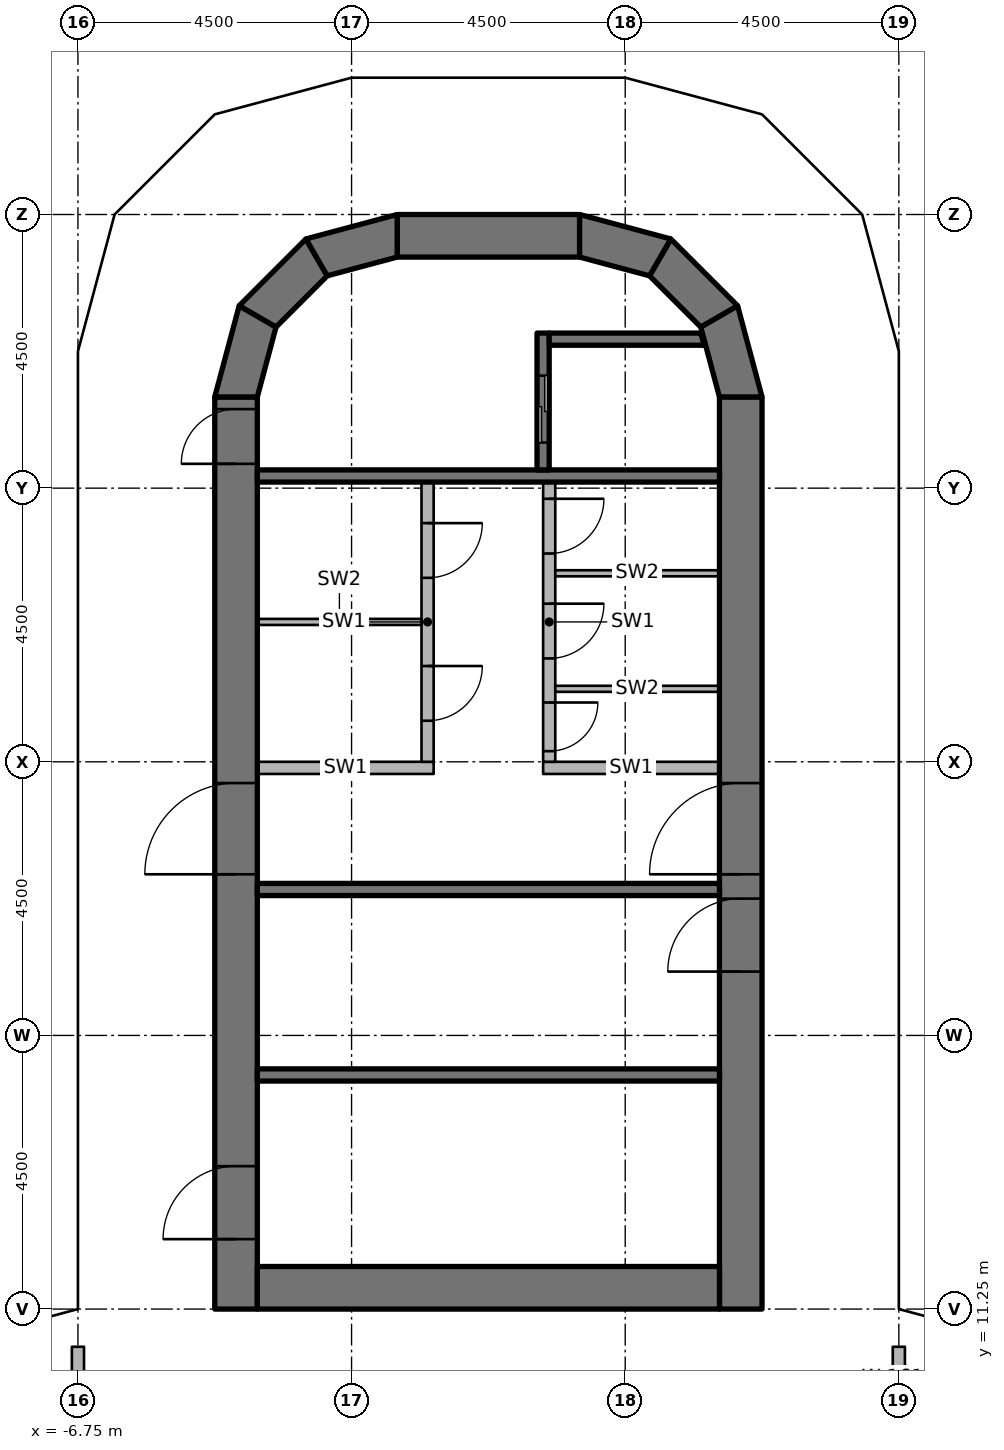
"""IFC4 building model, lengths in metres.
Left out: names, types, materials, properties, quantities, classifications, styles, units other than length and angle.
Written with IfcOpenShell. Run it as: python <this file> out.ifc"""

import sys

from ifc_helpers import new_model, si_unit, direction, frame, frame_2d, origin, origin_2d, place, context, subcontext, project, spatial, polyline, rectangle, outline, extrude, element, fill, save


model = new_model("IFC4")
c1 = context("Model", 3, precision=1e-05, world=origin(), true_north=direction((0.0, 1.0)))
c2 = subcontext(c1, "Body", "Model", "MODEL_VIEW")
j1 = project(units=[si_unit("LENGTHUNIT", "METRE"), si_unit("PLANEANGLEUNIT", "RADIAN")], contexts=[c1])
p1 = place(None, origin())
s1 = spatial("IfcSite", under=j1, at=p1, CompositionType="ELEMENT")
p2 = place(p1, origin())
s2 = spatial("IfcBuilding", under=s1, at=p2, CompositionType="ELEMENT")
p3 = place(p2, frame((0.0, 0.0, 156.2)))
s3 = spatial("IfcBuildingStorey", under=s2, at=p3, CompositionType="ELEMENT", Elevation=156.2)
for number, where, z_axis, x_axis in (
    (1, (-6.25, 10.75, 0.0), (0.0, 0.0, 1.0), (1.0, 0.0, 0.0)),
    (2, (-6.25, 15.75, 0.0), (0.0, 0.0, 1.0), (1.0, 0.0, 0.0)),
    (3, (-6.25, 20.25, 0.0), (0.0, 0.0, 1.0), (1.0, 0.0, 0.0)),
    (4, (-6.25, 24.65, 0.0), (0.0, 0.0, 1.0), (1.0, 0.0, 0.0)),
    (5, (-6.25, 26.7, 0.0), (0.0, 0.0, 1.0), (1.0, 0.0, 0.0)),
    (6, (6.25, 10.75, 0.0), (0.0, 0.0, 1.0), (1.0, 0.0, 0.0)),
    (7, (6.25, 15.75, 0.0), (0.0, 0.0, 1.0), (1.0, 0.0, 0.0)),
    (8, (6.25, 20.25, 0.0), (0.0, 0.0, 1.0), (1.0, 0.0, 0.0)),
    (9, (6.25, 24.65, 0.0), (0.0, 0.0, 1.0), (1.0, 0.0, 0.0)),
    (10, (6.25, 26.7, 0.0), (0.0, 0.0, 1.0), (1.0, 0.0, 0.0)),
):
    element("IfcColumn", number, at=place(p3, frame(where, z_axis=z_axis, x_axis=x_axis)), inside=s3, PredefinedType="COLUMN", context=c2, shape_type="SweptSolid", body=[
        extrude(rectangle(XDim=0.8, YDim=0.8, at=origin_2d()), origin(), (0.0, 0.0, 1.0), 3.65),
    ])
p4 = place(p3, frame((-4.15, 11.25, 0.0), z_axis=(0.0, 0.0, 1.0), x_axis=(0.0, 1.0, 0.0)))
e11 = element("IfcWall", 11, at=p4, inside=s3, PredefinedType="SHEAR", context=c2, shape_type="SweptSolid", body=[
    extrude(rectangle(XDim=15.0, YDim=0.7, at=frame_2d((7.5, 0.0))), origin(), (0.0, 0.0, 1.0), 3.8),
])
p5 = place(p4, frame((7.15, 0.0, 0.0)))
e12 = element("IfcOpeningElement", 12, at=p5, cuts=e11, PredefinedType="OPENING", context=c2, shape_type="SweptSolid", body=[
    extrude(rectangle(XDim=1.5, YDim=2.3, at=frame_2d((0.75, 1.15))), frame((0.0, 0.36, 0.0), z_axis=(0.0, -1.0, 0.0), x_axis=(1.0, 0.0, 0.0)), (0.0, 0.0, 1.0), 0.72),
])
p6 = place(p4, frame((13.9, 0.0, 0.0)))
e13 = element("IfcOpeningElement", 13, at=p6, cuts=e11, PredefinedType="OPENING", context=c2, shape_type="SweptSolid", body=[
    extrude(rectangle(XDim=0.9, YDim=2.1, at=frame_2d((0.45, 1.05))), frame((0.0, 0.36, 0.0), z_axis=(0.0, -1.0, 0.0), x_axis=(1.0, 0.0, 0.0)), (0.0, 0.0, 1.0), 0.72),
])
p7 = place(p4, frame((1.15, 0.0, 0.0)))
e14 = element("IfcOpeningElement", 14, at=p7, cuts=e11, PredefinedType="OPENING", context=c2, shape_type="SweptSolid", body=[
    extrude(rectangle(XDim=1.2, YDim=2.1, at=frame_2d((0.6, 1.05))), frame((0.0, 0.36, 0.0), z_axis=(0.0, -1.0, 0.0), x_axis=(1.0, 0.0, 0.0)), (0.0, 0.0, 1.0), 0.72),
])
p8 = place(p3, frame((4.15, 11.25, 0.0), z_axis=(0.0, 0.0, 1.0), x_axis=(0.0, 1.0, 0.0)))
e15 = element("IfcWall", 15, at=p8, inside=s3, PredefinedType="SHEAR", context=c2, shape_type="SweptSolid", body=[
    extrude(rectangle(XDim=15.0, YDim=0.7, at=frame_2d((7.5, 0.0))), origin(), (0.0, 0.0, 1.0), 3.8),
])
p9 = place(p8, frame((7.15, 0.0, 0.0)))
e16 = element("IfcOpeningElement", 16, at=p9, cuts=e15, PredefinedType="OPENING", context=c2, shape_type="SweptSolid", body=[
    extrude(rectangle(XDim=1.5, YDim=2.3, at=frame_2d((0.75, 1.15))), frame((0.0, 0.36, 0.0), z_axis=(0.0, -1.0, 0.0), x_axis=(1.0, 0.0, 0.0)), (0.0, 0.0, 1.0), 0.72),
])
p10 = place(p8, frame((5.55, 0.0, 0.0)))
e17 = element("IfcOpeningElement", 17, at=p10, cuts=e15, PredefinedType="OPENING", context=c2, shape_type="SweptSolid", body=[
    extrude(rectangle(XDim=1.2, YDim=2.1, at=frame_2d((0.6, 1.05))), frame((0.0, 0.36, 0.0), z_axis=(0.0, -1.0, 0.0), x_axis=(1.0, 0.0, 0.0)), (0.0, 0.0, 1.0), 0.72),
])
p11 = place(p3, frame((-3.8, 11.6, 0.0), z_axis=(0.0, 0.0, 1.0), x_axis=(1.0, 0.0, 0.0)))
e18 = element("IfcWall", 18, at=p11, inside=s3, PredefinedType="SHEAR", context=c2, shape_type="SweptSolid", body=[
    extrude(rectangle(XDim=7.6, YDim=0.7, at=frame_2d((3.8, 0.0))), origin(), (0.0, 0.0, 1.0), 3.8),
])
p12 = place(p3, frame((-1.5, 28.9, 0.0), z_axis=(0.0, 0.0, 1.0), x_axis=(1.0, 0.0, 0.0)))
e19 = element("IfcWall", 19, at=p12, inside=s3, PredefinedType="SHEAR", context=c2, shape_type="SweptSolid", body=[
    extrude(rectangle(XDim=3.0, YDim=0.7, at=frame_2d((1.5, 0.0))), origin(), (0.0, 0.0, 1.0), 3.8),
])
p13 = place(p3, origin())
e20 = element("IfcWall", 20, at=p13, inside=s3, PredefinedType="SHEAR", context=c2, shape_type="SweptSolid", body=[
    extrude(outline(polyline([(-4.5, 26.25), (-4.098, 27.75), (-3.492, 27.4), (-3.8, 26.25), (-4.5, 26.25)])), origin(), (0.0, 0.0, 1.0), 3.8),
])
p14 = place(p3, origin())
e21 = element("IfcWall", 21, at=p14, inside=s3, PredefinedType="SHEAR", context=c2, shape_type="SweptSolid", body=[
    extrude(outline(polyline([(-4.098, 27.75), (-3.0, 28.848), (-2.65, 28.242), (-3.492, 27.4), (-4.098, 27.75)])), origin(), (0.0, 0.0, 1.0), 3.8),
])
p15 = place(p3, origin())
e22 = element("IfcWall", 22, at=p15, inside=s3, PredefinedType="SHEAR", context=c2, shape_type="SweptSolid", body=[
    extrude(outline(polyline([(-3.0, 28.848), (-1.5, 29.25), (-1.5, 28.55), (-2.65, 28.242), (-3.0, 28.848)])), origin(), (0.0, 0.0, 1.0), 3.8),
])
p16 = place(p3, origin())
e23 = element("IfcWall", 23, at=p16, inside=s3, PredefinedType="SHEAR", context=c2, shape_type="SweptSolid", body=[
    extrude(outline(polyline([(4.5, 26.25), (4.098, 27.75), (3.492, 27.4), (3.8, 26.25), (4.5, 26.25)])), origin(), (0.0, 0.0, 1.0), 3.8),
])
p17 = place(p3, origin())
e24 = element("IfcWall", 24, at=p17, inside=s3, PredefinedType="SHEAR", context=c2, shape_type="SweptSolid", body=[
    extrude(outline(polyline([(4.098, 27.75), (3.0, 28.848), (2.65, 28.242), (3.492, 27.4), (4.098, 27.75)])), origin(), (0.0, 0.0, 1.0), 3.8),
])
p18 = place(p3, origin())
e25 = element("IfcWall", 25, at=p18, inside=s3, PredefinedType="SHEAR", context=c2, shape_type="SweptSolid", body=[
    extrude(outline(polyline([(3.0, 28.848), (1.5, 29.25), (1.5, 28.55), (2.65, 28.242), (3.0, 28.848)])), origin(), (0.0, 0.0, 1.0), 3.8),
])
p19 = place(p3, frame((-3.8, 24.95, 0.0), z_axis=(0.0, 0.0, 1.0), x_axis=(1.0, 0.0, 0.0)))
e26 = element("IfcWall", 26, at=p19, inside=s3, PredefinedType="SHEAR", context=c2, shape_type="SweptSolid", body=[
    extrude(rectangle(XDim=7.6, YDim=0.2, at=frame_2d((3.8, 0.0))), origin(), (0.0, 0.0, 1.0), 3.65),
])
p20 = place(p3, frame((0.9, 27.3, 0.0), z_axis=(0.0, 0.0, 1.0), x_axis=(0.0, -1.0, 0.0)))
e27 = element("IfcWall", 27, at=p20, inside=s3, PredefinedType="SHEAR", context=c2, shape_type="SweptSolid", body=[
    extrude(rectangle(XDim=2.25, YDim=0.2, at=frame_2d((1.125, 0.0))), origin(), (0.0, 0.0, 1.0), 3.65),
])
p21 = place(p20, frame((0.7, 0.0, 0.0)))
e28 = element("IfcOpeningElement", 28, at=p21, cuts=e27, PredefinedType="OPENING", context=c2, shape_type="SweptSolid", body=[
    extrude(rectangle(XDim=1.1, YDim=2.3, at=frame_2d((0.55, 1.15))), frame((0.0, 0.11, 0.0), z_axis=(0.0, -1.0, 0.0), x_axis=(1.0, 0.0, 0.0)), (0.0, 0.0, 1.0), 0.22),
])
p22 = place(p3, origin())
e29 = element("IfcWall", 29, at=p22, inside=s3, PredefinedType="SHEAR", context=c2, shape_type="SweptSolid", body=[
    extrude(outline(polyline([(1.0, 27.1), (3.548, 27.1), (3.494, 27.3), (1.0, 27.3), (1.0, 27.1)])), origin(), (0.0, 0.0, 1.0), 3.65),
])
for number, where, z_axis, x_axis in (
    (30, (-3.8, 18.15, 0.0), (0.0, 0.0, 1.0), (1.0, 0.0, 0.0)),
    (31, (-3.8, 15.1, 0.0), (0.0, 0.0, 1.0), (1.0, 0.0, 0.0)),
):
    element("IfcWall", number, at=place(p3, frame(where, z_axis=z_axis, x_axis=x_axis)), inside=s3, PredefinedType="SHEAR", context=c2, shape_type="SweptSolid", body=[
        extrude(rectangle(XDim=7.6, YDim=0.2, at=frame_2d((3.8, 0.0))), origin(), (0.0, 0.0, 1.0), 3.65),
    ])
p23 = place(p3, frame((-3.8, 20.15, 0.0), z_axis=(0.0, 0.0, 1.0), x_axis=(1.0, 0.0, 0.0)))
e32 = element("IfcWall", 32, at=p23, inside=s3, PredefinedType="PARTITIONING", context=c2, shape_type="SweptSolid", body=[
    extrude(rectangle(XDim=2.9, YDim=0.2, at=frame_2d((1.45, 0.0))), origin(), (0.0, 0.0, 1.0), 3.65),
])
p24 = place(p3, frame((-1.0, 24.85, 0.0), z_axis=(0.0, 0.0, 1.0), x_axis=(0.0, -1.0, 0.0)))
e33 = element("IfcWall", 33, at=p24, inside=s3, PredefinedType="PARTITIONING", context=c2, shape_type="SweptSolid", body=[
    extrude(rectangle(XDim=4.6, YDim=0.2, at=frame_2d((2.3, 0.0))), origin(), (0.0, 0.0, 1.0), 3.65),
])
p25 = place(p24, frame((0.675, 0.0, 0.0)))
e34 = element("IfcOpeningElement", 34, at=p25, cuts=e33, PredefinedType="OPENING", context=c2, shape_type="SweptSolid", body=[
    extrude(rectangle(XDim=0.9, YDim=2.1, at=frame_2d((0.45, 1.05))), frame((0.0, 0.11, 0.0), z_axis=(0.0, -1.0, 0.0), x_axis=(1.0, 0.0, 0.0)), (0.0, 0.0, 1.0), 0.22),
])
p26 = place(p24, frame((3.025, 0.0, 0.0)))
e35 = element("IfcOpeningElement", 35, at=p26, cuts=e33, PredefinedType="OPENING", context=c2, shape_type="SweptSolid", body=[
    extrude(rectangle(XDim=0.9, YDim=2.1, at=frame_2d((0.45, 1.05))), frame((0.0, 0.11, 0.0), z_axis=(0.0, -1.0, 0.0), x_axis=(1.0, 0.0, 0.0)), (0.0, 0.0, 1.0), 0.22),
])
p27 = place(p3, frame((0.9, 20.15, 0.0), z_axis=(0.0, 0.0, 1.0), x_axis=(1.0, 0.0, 0.0)))
e36 = element("IfcWall", 36, at=p27, inside=s3, PredefinedType="PARTITIONING", context=c2, shape_type="SweptSolid", body=[
    extrude(rectangle(XDim=2.9, YDim=0.2, at=frame_2d((1.45, 0.0))), origin(), (0.0, 0.0, 1.0), 3.65),
])
p28 = place(p3, frame((1.0, 24.85, 0.0), z_axis=(0.0, 0.0, 1.0), x_axis=(0.0, -1.0, 0.0)))
e37 = element("IfcWall", 37, at=p28, inside=s3, PredefinedType="PARTITIONING", context=c2, shape_type="SweptSolid", body=[
    extrude(rectangle(XDim=4.6, YDim=0.2, at=frame_2d((2.3, 0.0))), origin(), (0.0, 0.0, 1.0), 3.65),
])
p29 = place(p28, frame((0.275, 0.0, 0.0)))
e38 = element("IfcOpeningElement", 38, at=p29, cuts=e37, PredefinedType="OPENING", context=c2, shape_type="SweptSolid", body=[
    extrude(rectangle(XDim=0.9, YDim=2.1, at=frame_2d((0.45, 1.05))), frame((0.0, 0.11, 0.0), z_axis=(0.0, -1.0, 0.0), x_axis=(1.0, 0.0, 0.0)), (0.0, 0.0, 1.0), 0.22),
])
p30 = place(p28, frame((2.0, 0.0, 0.0)))
e39 = element("IfcOpeningElement", 39, at=p30, cuts=e37, PredefinedType="OPENING", context=c2, shape_type="SweptSolid", body=[
    extrude(rectangle(XDim=0.9, YDim=2.1, at=frame_2d((0.45, 1.05))), frame((0.0, 0.11, 0.0), z_axis=(0.0, -1.0, 0.0), x_axis=(1.0, 0.0, 0.0)), (0.0, 0.0, 1.0), 0.22),
])
p31 = place(p28, frame((3.625, 0.0, 0.0)))
e40 = element("IfcOpeningElement", 40, at=p31, cuts=e37, PredefinedType="OPENING", context=c2, shape_type="SweptSolid", body=[
    extrude(rectangle(XDim=0.8, YDim=2.1, at=frame_2d((0.4, 1.05))), frame((0.0, 0.11, 0.0), z_axis=(0.0, -1.0, 0.0), x_axis=(1.0, 0.0, 0.0)), (0.0, 0.0, 1.0), 0.22),
])
for number, where, z_axis, x_axis in (
    (41, (-3.8, 22.55, 0.0), (0.0, 0.0, 1.0), (1.0, 0.0, 0.0)),
    (42, (1.1, 23.35, 0.0), (0.0, 0.0, 1.0), (1.0, 0.0, 0.0)),
    (43, (1.1, 21.45, 0.0), (0.0, 0.0, 1.0), (1.0, 0.0, 0.0)),
):
    element("IfcWall", number, at=place(p3, frame(where, z_axis=z_axis, x_axis=x_axis)), inside=s3, PredefinedType="PARTITIONING", context=c2, shape_type="SweptSolid", body=[
        extrude(rectangle(XDim=2.7, YDim=0.1, at=frame_2d((1.35, 0.0))), origin(), (0.0, 0.0, 1.0), 3.65),
    ])
p32 = place(p3, frame((6.75, 10.63, 0.0), z_axis=(0.0, 0.0, 1.0), x_axis=(0.0, -1.0, 0.0)))
e44 = element("IfcWall", 44, at=p32, inside=s3, PredefinedType="PARTITIONING", context=c2, shape_type="SweptSolid", body=[
    extrude(rectangle(XDim=3.78, YDim=0.2, at=frame_2d((1.89, 0.0))), origin(), (0.0, 0.0, 1.0), 2.75),
])
p33 = place(p32, frame((1.44, 0.0, 0.0)))
e45 = element("IfcOpeningElement", 45, at=p33, cuts=e44, PredefinedType="OPENING", context=c2, shape_type="SweptSolid", body=[
    extrude(rectangle(XDim=0.9, YDim=2.1, at=frame_2d((0.45, 1.05))), frame((0.0, 0.11, 0.0), z_axis=(0.0, -1.0, 0.0), x_axis=(1.0, 0.0, 0.0)), (0.0, 0.0, 1.0), 0.22),
])
p34 = place(p3, frame((-6.75, 6.85, 0.0), z_axis=(0.0, 0.0, 1.0), x_axis=(0.0, 1.0, 0.0)))
e46 = element("IfcWall", 46, at=p34, inside=s3, PredefinedType="PARTITIONING", context=c2, shape_type="SweptSolid", body=[
    extrude(rectangle(XDim=3.78, YDim=0.2, at=frame_2d((1.89, 0.0))), origin(), (0.0, 0.0, 1.0), 2.75),
])
p35 = place(p5, origin())
e47 = element("IfcDoor", 47, at=p35, inside=s3, OperationType="DOUBLE_DOOR_SINGLE_SWING", PredefinedType="DOOR", context=c2, shape_type="SweptSolid", body=[
    extrude(rectangle(XDim=1.5, YDim=2.3, at=frame_2d((0.75, 1.15))), frame((0.0, 0.025, 0.0), z_axis=(0.0, -1.0, 0.0), x_axis=(1.0, 0.0, 0.0)), (0.0, 0.0, 1.0), 0.05),
])
fill(e12, e47)
p36 = place(p9, origin())
e48 = element("IfcDoor", 48, at=p36, inside=s3, OperationType="DOUBLE_DOOR_SINGLE_SWING", PredefinedType="DOOR", context=c2, shape_type="SweptSolid", body=[
    extrude(rectangle(XDim=1.5, YDim=2.3, at=frame_2d((0.75, 1.15))), frame((0.0, 0.025, 0.0), z_axis=(0.0, -1.0, 0.0), x_axis=(1.0, 0.0, 0.0)), (0.0, 0.0, 1.0), 0.05),
])
fill(e16, e48)
p37 = place(p6, origin())
e49 = element("IfcDoor", 49, at=p37, inside=s3, OperationType="SINGLE_SWING_LEFT", PredefinedType="DOOR", context=c2, shape_type="SweptSolid", body=[
    extrude(rectangle(XDim=0.9, YDim=2.1, at=frame_2d((0.45, 1.05))), frame((0.0, 0.025, 0.0), z_axis=(0.0, -1.0, 0.0), x_axis=(1.0, 0.0, 0.0)), (0.0, 0.0, 1.0), 0.05),
])
fill(e13, e49)
p38 = place(p10, origin())
e50 = element("IfcDoor", 50, at=p38, inside=s3, OperationType="SINGLE_SWING_LEFT", PredefinedType="DOOR", context=c2, shape_type="SweptSolid", body=[
    extrude(rectangle(XDim=1.2, YDim=2.1, at=frame_2d((0.6, 1.05))), frame((0.0, 0.025, 0.0), z_axis=(0.0, -1.0, 0.0), x_axis=(1.0, 0.0, 0.0)), (0.0, 0.0, 1.0), 0.05),
])
fill(e17, e50)
p39 = place(p7, origin())
e51 = element("IfcDoor", 51, at=p39, inside=s3, OperationType="SINGLE_SWING_RIGHT", PredefinedType="DOOR", context=c2, shape_type="SweptSolid", body=[
    extrude(rectangle(XDim=1.2, YDim=2.1, at=frame_2d((0.6, 1.05))), frame((0.0, 0.025, 0.0), z_axis=(0.0, -1.0, 0.0), x_axis=(1.0, 0.0, 0.0)), (0.0, 0.0, 1.0), 0.05),
])
fill(e14, e51)
p40 = place(p21, origin())
e52 = element("IfcDoor", 52, at=p40, inside=s3, OperationType="DOUBLE_DOOR_SLIDING", PredefinedType="DOOR", context=c2, shape_type="SweptSolid", body=[
    extrude(rectangle(XDim=1.1, YDim=2.3, at=frame_2d((0.55, 1.15))), frame((0.0, 0.025, 0.0), z_axis=(0.0, -1.0, 0.0), x_axis=(1.0, 0.0, 0.0)), (0.0, 0.0, 1.0), 0.05),
])
fill(e28, e52)
p41 = place(p25, origin())
e53 = element("IfcDoor", 53, at=p41, inside=s3, OperationType="SINGLE_SWING_RIGHT", PredefinedType="DOOR", context=c2, shape_type="SweptSolid", body=[
    extrude(rectangle(XDim=0.9, YDim=2.1, at=frame_2d((0.45, 1.05))), frame((0.0, 0.025, 0.0), z_axis=(0.0, -1.0, 0.0), x_axis=(1.0, 0.0, 0.0)), (0.0, 0.0, 1.0), 0.05),
])
fill(e34, e53)
p42 = place(p26, origin())
e54 = element("IfcDoor", 54, at=p42, inside=s3, OperationType="SINGLE_SWING_RIGHT", PredefinedType="DOOR", context=c2, shape_type="SweptSolid", body=[
    extrude(rectangle(XDim=0.9, YDim=2.1, at=frame_2d((0.45, 1.05))), frame((0.0, 0.025, 0.0), z_axis=(0.0, -1.0, 0.0), x_axis=(1.0, 0.0, 0.0)), (0.0, 0.0, 1.0), 0.05),
])
fill(e35, e54)
p43 = place(p29, origin())
e55 = element("IfcDoor", 55, at=p43, inside=s3, OperationType="SINGLE_SWING_RIGHT", PredefinedType="DOOR", context=c2, shape_type="SweptSolid", body=[
    extrude(rectangle(XDim=0.9, YDim=2.1, at=frame_2d((0.45, 1.05))), frame((0.0, 0.025, 0.0), z_axis=(0.0, -1.0, 0.0), x_axis=(1.0, 0.0, 0.0)), (0.0, 0.0, 1.0), 0.05),
])
fill(e38, e55)
p44 = place(p30, origin())
e56 = element("IfcDoor", 56, at=p44, inside=s3, OperationType="SINGLE_SWING_RIGHT", PredefinedType="DOOR", context=c2, shape_type="SweptSolid", body=[
    extrude(rectangle(XDim=0.9, YDim=2.1, at=frame_2d((0.45, 1.05))), frame((0.0, 0.025, 0.0), z_axis=(0.0, -1.0, 0.0), x_axis=(1.0, 0.0, 0.0)), (0.0, 0.0, 1.0), 0.05),
])
fill(e39, e56)
p45 = place(p31, origin())
e57 = element("IfcDoor", 57, at=p45, inside=s3, OperationType="SINGLE_SWING_LEFT", PredefinedType="DOOR", context=c2, shape_type="SweptSolid", body=[
    extrude(rectangle(XDim=0.8, YDim=2.1, at=frame_2d((0.4, 1.05))), frame((0.0, 0.025, 0.0), z_axis=(0.0, -1.0, 0.0), x_axis=(1.0, 0.0, 0.0)), (0.0, 0.0, 1.0), 0.05),
])
fill(e40, e57)
save(model, sys.argv[1])
